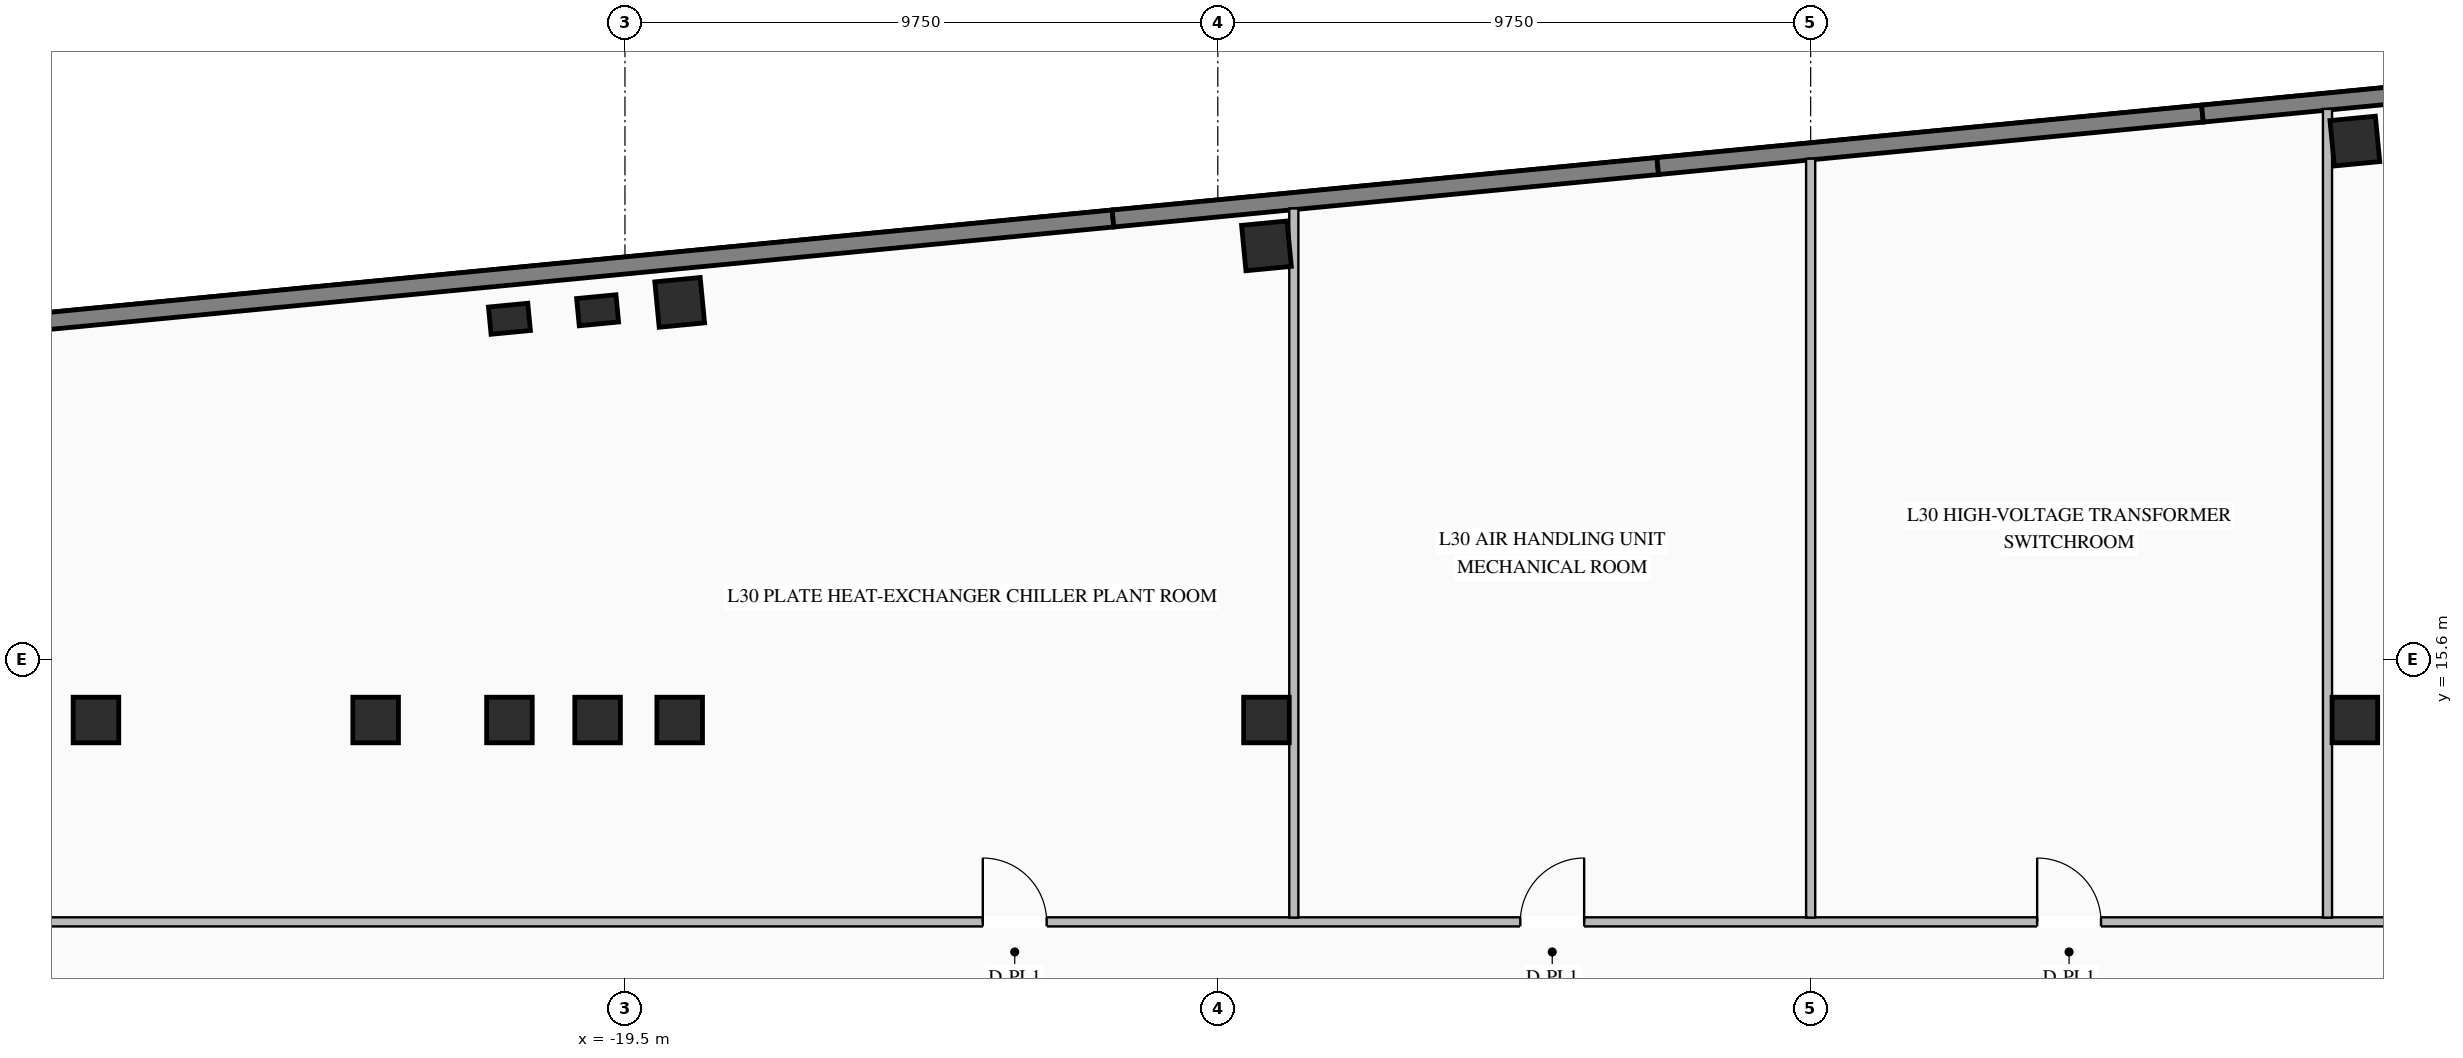
"""IFC4 building model, lengths in metres.
Left out: names, types, materials, properties, quantities, classifications, styles, units other than length and angle.
Written with IfcOpenShell. Run it as: python <this file> out.ifc"""

import sys

from ifc_helpers import new_model, si_unit, direction, frame, frame_2d, origin, origin_2d, place, context, subcontext, project, spatial, rectangle, i_section, extrude, element, fill, save


model = new_model("IFC4")
c1 = context("Model", 3, precision=1e-05, world=origin(), true_north=direction((0.0, 1.0)))
c2 = subcontext(c1, "Body", "Model", "MODEL_VIEW")
j1 = project(units=[si_unit("LENGTHUNIT", "METRE"), si_unit("PLANEANGLEUNIT", "RADIAN")], contexts=[c1])
p1 = place(None, origin())
s1 = spatial("IfcSite", under=j1, at=p1, CompositionType="ELEMENT")
p2 = place(p1, origin())
s2 = spatial("IfcBuilding", under=s1, at=p2, CompositionType="ELEMENT")
p3 = place(p2, frame((0.0, 0.0, 112.15)))
s3 = spatial("IfcBuildingStorey", under=s2, at=p3, CompositionType="ELEMENT", Elevation=112.15)
for number, where, z_axis, x_axis in (
    (1, (-21.4, 14.6, 0.0), (0.0, 0.0, 1.0), (1.0, 0.0, 0.0)),
    (2, (-19.95, 14.6, 0.0), (0.0, 0.0, 1.0), (1.0, 0.0, 0.0)),
    (3, (-18.6, 14.6, 0.0), (0.0, 0.0, 1.0), (1.0, 0.0, 0.0)),
    (4, (-8.95, 14.6, 0.0), (0.0, 0.0, 1.0), (1.0, 0.0, 0.0)),
    (5, (8.95, 14.6, 0.0), (0.0, 0.0, 1.0), (1.0, 0.0, 0.0)),
    (6, (-23.6, 14.6, 0.0), (0.0, 0.0, 1.0), (1.0, 0.0, 0.0)),
    (7, (-28.2, 14.6, 0.0), (0.0, 0.0, 1.0), (1.0, 0.0, 0.0)),
    (8, (-18.6, 21.469, 0.0), (0.0, 0.0, 1.0), (0.995, 0.096, 0.0)),
    (9, (-8.95, 22.398, 0.0), (0.0, 0.0, 1.0), (0.995, 0.096, 0.0)),
    (10, (8.95, 24.122, 0.0), (0.0, 0.0, 1.0), (0.995, 0.096, 0.0)),
):
    element("IfcColumn", number, at=place(p3, frame(where, z_axis=z_axis, x_axis=x_axis)), inside=s3, PredefinedType="COLUMN", context=c2, shape_type="SweptSolid", body=[
        extrude(i_section(OverallWidth=0.75, OverallDepth=0.75, WebThickness=0.03, FlangeThickness=0.044, at=origin_2d()), origin(), (0.0, 0.0, 1.0), 4.5),
    ])
for number, where, z_axis, x_axis in (
    (11, (-21.4, 21.199, 0.0), (0.0, 0.0, 1.0), (0.995, 0.096, 0.0)),
    (12, (-19.95, 21.339, 0.0), (0.0, 0.0, 1.0), (0.995, 0.096, 0.0)),
):
    element("IfcColumn", number, at=place(p3, frame(where, z_axis=z_axis, x_axis=x_axis)), inside=s3, PredefinedType="PILASTER", context=c2, shape_type="SweptSolid", body=[
        extrude(rectangle(XDim=0.65, YDim=0.45, at=origin_2d()), origin(), (0.0, 0.0, 1.0), 4.5),
    ])
p4 = place(p3, frame((-29.231, 21.138, 0.0), z_axis=(0.0, 0.0, 1.0), x_axis=(0.995395780835, 0.095850088663, 0.0)))
e13 = element("IfcWall", 13, at=p4, inside=s3, PredefinedType="STANDARD", context=c2, shape_type="SweptSolid", body=[
    extrude(rectangle(XDim=17.84, YDim=0.28, at=frame_2d((8.92, 0.0))), origin(), (0.0, 0.0, 1.0), 4.2),
])
p5 = place(p3, frame((-11.474, 22.848, 0.0), z_axis=(0.0, 0.0, 1.0), x_axis=(0.995396794462, 0.09583956164, 0.0)))
e14 = element("IfcWall", 14, at=p5, inside=s3, PredefinedType="STANDARD", context=c2, shape_type="SweptSolid", body=[
    extrude(rectangle(XDim=9.0, YDim=0.28, at=frame_2d((4.5, 0.0))), origin(), (0.0, 0.0, 1.0), 4.2),
])
p6 = place(p3, frame((-2.515, 23.711, 0.0), z_axis=(0.0, 0.0, 1.0), x_axis=(0.995397043619, 0.095836973841, 0.0)))
e15 = element("IfcWall", 15, at=p6, inside=s3, PredefinedType="STANDARD", context=c2, shape_type="SweptSolid", body=[
    extrude(rectangle(XDim=9.0, YDim=0.28, at=frame_2d((4.5, 0.0))), origin(), (0.0, 0.0, 1.0), 4.2),
])
p7 = place(p3, frame((6.444, 24.573, 0.0), z_axis=(0.0, 0.0, 1.0), x_axis=(0.995396794462, 0.09583956164, 0.0)))
e16 = element("IfcWall", 16, at=p7, inside=s3, PredefinedType="STANDARD", context=c2, shape_type="SweptSolid", body=[
    extrude(rectangle(XDim=9.0, YDim=0.28, at=frame_2d((4.5, 0.0))), origin(), (0.0, 0.0, 1.0), 4.2),
])
p8 = place(p3, frame((-30.573, 11.28, 0.0), z_axis=(0.0, 0.0, 1.0), x_axis=(1.0, 0.0, 0.0)))
e17 = element("IfcWall", 17, at=p8, inside=s3, PredefinedType="STANDARD", context=c2, shape_type="SweptSolid", body=[
    extrude(rectangle(XDim=67.551, YDim=0.15, at=frame_2d((33.775, 0.0))), origin(), (0.0, 0.0, 1.0), 4.2),
])
p9 = place(p8, frame((16.958, 0.0, 0.0)))
e18 = element("IfcOpeningElement", 18, at=p9, cuts=e17, PredefinedType="OPENING", context=c2, shape_type="SweptSolid", body=[
    extrude(rectangle(XDim=1.05, YDim=2.08, at=frame_2d((0.525, 1.04))), frame((0.0, 0.085, 0.0), z_axis=(0.0, -1.0, 0.0), x_axis=(1.0, 0.0, 0.0)), (0.0, 0.0, 1.0), 0.17),
])
p10 = place(p8, frame((25.798, 0.0, 0.0)))
e19 = element("IfcOpeningElement", 19, at=p10, cuts=e17, PredefinedType="OPENING", context=c2, shape_type="SweptSolid", body=[
    extrude(rectangle(XDim=1.05, YDim=2.08, at=frame_2d((0.525, 1.04))), frame((0.0, 0.085, 0.0), z_axis=(0.0, -1.0, 0.0), x_axis=(1.0, 0.0, 0.0)), (0.0, 0.0, 1.0), 0.17),
])
p11 = place(p8, frame((34.298, 0.0, 0.0)))
e20 = element("IfcOpeningElement", 20, at=p11, cuts=e17, PredefinedType="OPENING", context=c2, shape_type="SweptSolid", body=[
    extrude(rectangle(XDim=1.05, YDim=2.08, at=frame_2d((0.525, 1.04))), frame((0.0, 0.085, 0.0), z_axis=(0.0, -1.0, 0.0), x_axis=(1.0, 0.0, 0.0)), (0.0, 0.0, 1.0), 0.17),
])
p12 = place(p8, frame((43.138, 0.0, 0.0)))
e21 = element("IfcOpeningElement", 21, at=p12, cuts=e17, PredefinedType="OPENING", context=c2, shape_type="SweptSolid", body=[
    extrude(rectangle(XDim=1.05, YDim=2.08, at=frame_2d((0.525, 1.04))), frame((0.0, 0.085, 0.0), z_axis=(0.0, -1.0, 0.0), x_axis=(1.0, 0.0, 0.0)), (0.0, 0.0, 1.0), 0.17),
])
p13 = place(p3, frame((-8.5, 11.35, 0.0), z_axis=(0.0, 0.0, 1.0), x_axis=(0.0, 1.0, 0.0)))
e22 = element("IfcWall", 22, at=p13, inside=s3, PredefinedType="STANDARD", context=c2, shape_type="SweptSolid", body=[
    extrude(rectangle(XDim=11.664, YDim=0.15, at=frame_2d((5.832, 0.0))), origin(), (0.0, 0.0, 1.0), 4.2),
])
p14 = place(p3, frame((0.0, 11.35, 0.0), z_axis=(0.0, 0.0, 1.0), x_axis=(0.0, 1.0, 0.0)))
e23 = element("IfcWall", 23, at=p14, inside=s3, PredefinedType="STANDARD", context=c2, shape_type="SweptSolid", body=[
    extrude(rectangle(XDim=12.482, YDim=0.15, at=frame_2d((6.241, 0.0))), origin(), (0.0, 0.0, 1.0), 4.2),
])
p15 = place(p3, frame((8.5, 11.35, 0.0), z_axis=(0.0, 0.0, 1.0), x_axis=(0.0, 1.0, 0.0)))
e24 = element("IfcWall", 24, at=p15, inside=s3, PredefinedType="STANDARD", context=c2, shape_type="SweptSolid", body=[
    extrude(rectangle(XDim=13.301, YDim=0.15, at=frame_2d((6.65, 0.0))), origin(), (0.0, 0.0, 1.0), 4.2),
])
p16 = place(p9, origin())
e25 = element("IfcDoor", 25, at=p16, inside=s3, OperationType="SINGLE_SWING_LEFT", PredefinedType="DOOR", context=c2, shape_type="SweptSolid", body=[
    extrude(rectangle(XDim=1.05, YDim=2.08, at=frame_2d((0.525, 1.04))), frame((0.0, 0.025, 0.0), z_axis=(0.0, -1.0, 0.0), x_axis=(1.0, 0.0, 0.0)), (0.0, 0.0, 1.0), 0.05),
])
fill(e18, e25)
p17 = place(p10, origin())
e26 = element("IfcDoor", 26, at=p17, inside=s3, OperationType="SINGLE_SWING_RIGHT", PredefinedType="DOOR", context=c2, shape_type="SweptSolid", body=[
    extrude(rectangle(XDim=1.05, YDim=2.08, at=frame_2d((0.525, 1.04))), frame((0.0, 0.025, 0.0), z_axis=(0.0, -1.0, 0.0), x_axis=(1.0, 0.0, 0.0)), (0.0, 0.0, 1.0), 0.05),
])
fill(e19, e26)
p18 = place(p11, origin())
e27 = element("IfcDoor", 27, at=p18, inside=s3, OperationType="SINGLE_SWING_LEFT", PredefinedType="DOOR", context=c2, shape_type="SweptSolid", body=[
    extrude(rectangle(XDim=1.05, YDim=2.08, at=frame_2d((0.525, 1.04))), frame((0.0, 0.025, 0.0), z_axis=(0.0, -1.0, 0.0), x_axis=(1.0, 0.0, 0.0)), (0.0, 0.0, 1.0), 0.05),
])
fill(e20, e27)
save(model, sys.argv[1])
